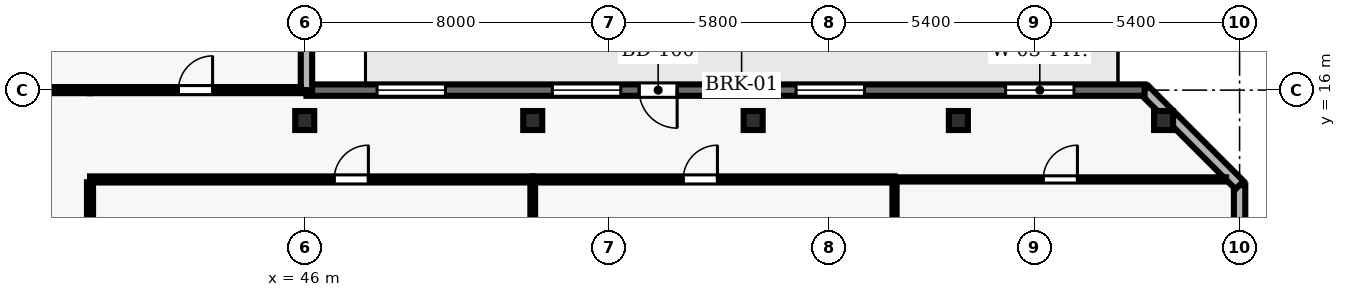
"""IFC4 building model, lengths in metres.
Left out: names, types, materials, properties, quantities, classifications, styles, units other than length and angle.
Written with IfcOpenShell. Run it as: python <this file> out.ifc"""

import sys

from ifc_helpers import new_model, si_unit, direction, frame, frame_2d, origin, origin_2d, place, context, subcontext, project, spatial, rectangle, hollow_rectangle, extrude, element, fill, save


model = new_model("IFC4")
c1 = context("Model", 3, precision=1e-05, world=origin(), true_north=direction((0.0, 1.0)))
c2 = subcontext(c1, "Body", "Model", "MODEL_VIEW")
j1 = project(units=[si_unit("LENGTHUNIT", "METRE"), si_unit("PLANEANGLEUNIT", "RADIAN")], contexts=[c1])
p1 = place(None, origin())
s1 = spatial("IfcSite", under=j1, at=p1, CompositionType="ELEMENT")
p2 = place(p1, origin())
s2 = spatial("IfcBuilding", under=s1, at=p2, CompositionType="ELEMENT")
p3 = place(p2, frame((0.0, 0.0, 142.4)))
s3 = spatial("IfcBuildingStorey", under=s2, at=p3, CompositionType="ELEMENT", Elevation=142.4)
for number, where, z_axis, x_axis in (
    (1, (46.0, 15.2, 0.0), (0.0, 0.0, 1.0), (1.0, 0.0, 0.0)),
    (2, (52.0, 15.2, 0.0), (0.0, 0.0, 1.0), (1.0, 0.0, 0.0)),
    (3, (57.8, 15.2, 0.0), (0.0, 0.0, 1.0), (1.0, 0.0, 0.0)),
    (4, (63.2, 15.2, 0.0), (0.0, 0.0, 1.0), (1.0, 0.0, 0.0)),
    (5, (68.6, 15.2, 0.0), (0.0, 0.0, 1.0), (1.0, 0.0, 0.0)),
):
    element("IfcColumn", number, at=place(p3, frame(where, z_axis=z_axis, x_axis=x_axis)), inside=s3, PredefinedType="COLUMN", context=c2, shape_type="SweptSolid", body=[
        extrude(hollow_rectangle(XDim=0.5, YDim=0.5, WallThickness=0.025, at=origin_2d()), origin(), (0.0, 0.0, 1.0), 3.9),
    ])
p4 = place(p3, frame((70.6, 2.5, 0.0), z_axis=(0.0, 0.0, 1.0), x_axis=(0.0, 1.0, 0.0)))
e6 = element("IfcWall", 6, at=p4, inside=s3, PredefinedType="SOLIDWALL", context=c2, shape_type="SweptSolid", body=[
    extrude(rectangle(XDim=11.0, YDim=0.3, at=frame_2d((5.5, 0.0))), origin(), (0.0, 0.0, 1.0), 3.69),
])
p5 = place(p4, frame((2.15, 0.0, 0.9)))
e7 = element("IfcOpeningElement", 7, at=p5, cuts=e6, PredefinedType="OPENING", context=c2, shape_type="SweptSolid", body=[
    extrude(rectangle(XDim=1.2, YDim=1.6, at=frame_2d((0.6, 0.8))), frame((0.0, 0.16, 0.0), z_axis=(0.0, -1.0, 0.0), x_axis=(1.0, 0.0, 0.0)), (0.0, 0.0, 1.0), 0.32),
])
p6 = place(p4, frame((7.65, 0.0, 0.9)))
e8 = element("IfcOpeningElement", 8, at=p6, cuts=e6, PredefinedType="OPENING", context=c2, shape_type="SweptSolid", body=[
    extrude(rectangle(XDim=1.2, YDim=1.6, at=frame_2d((0.6, 0.8))), frame((0.0, 0.16, 0.0), z_axis=(0.0, -1.0, 0.0), x_axis=(1.0, 0.0, 0.0)), (0.0, 0.0, 1.0), 0.32),
])
p7 = place(p3, frame((70.6, 13.5, 0.0), z_axis=(0.0, 0.0, 1.0), x_axis=(-0.707106781187, 0.707106781187, 0.0)))
e9 = element("IfcWall", 9, at=p7, inside=s3, PredefinedType="SOLIDWALL", context=c2, shape_type="SweptSolid", body=[
    extrude(rectangle(XDim=3.536, YDim=0.3, at=frame_2d((1.768, 0.0))), origin(), (0.0, 0.0, 1.0), 3.69),
])
p8 = place(p3, frame((68.1, 16.0, 0.0), z_axis=(0.0, 0.0, 1.0), x_axis=(-1.0, 0.0, 0.0)))
e10 = element("IfcWall", 10, at=p8, inside=s3, PredefinedType="SOLIDWALL", context=c2, shape_type="SweptSolid", body=[
    extrude(rectangle(XDim=22.054, YDim=0.3, at=frame_2d((11.027, 0.0))), origin(), (0.0, 0.0, 1.0), 3.69),
])
p9 = place(p8, frame((12.3, 0.0, 0.0)))
e11 = element("IfcOpeningElement", 11, at=p9, cuts=e10, PredefinedType="OPENING", context=c2, shape_type="SweptSolid", body=[
    extrude(rectangle(XDim=1.0, YDim=2.2, at=frame_2d((0.5, 1.1))), frame((0.0, 0.16, 0.0), z_axis=(0.0, -1.0, 0.0), x_axis=(1.0, 0.0, 0.0)), (0.0, 0.0, 1.0), 0.32),
])
p10 = place(p8, frame((1.857, 0.0, 0.9)))
e12 = element("IfcOpeningElement", 12, at=p10, cuts=e10, PredefinedType="OPENING", context=c2, shape_type="SweptSolid", body=[
    extrude(rectangle(XDim=1.8, YDim=1.6, at=frame_2d((0.9, 0.8))), frame((0.0, 0.16, 0.0), z_axis=(0.0, -1.0, 0.0), x_axis=(1.0, 0.0, 0.0)), (0.0, 0.0, 1.0), 0.32),
])
p11 = place(p8, frame((7.37, 0.0, 0.9)))
e13 = element("IfcOpeningElement", 13, at=p11, cuts=e10, PredefinedType="OPENING", context=c2, shape_type="SweptSolid", body=[
    extrude(rectangle(XDim=1.8, YDim=1.6, at=frame_2d((0.9, 0.8))), frame((0.0, 0.16, 0.0), z_axis=(0.0, -1.0, 0.0), x_axis=(1.0, 0.0, 0.0)), (0.0, 0.0, 1.0), 0.32),
])
p12 = place(p8, frame((13.784, 0.0, 0.9)))
e14 = element("IfcOpeningElement", 14, at=p12, cuts=e10, PredefinedType="OPENING", context=c2, shape_type="SweptSolid", body=[
    extrude(rectangle(XDim=1.8, YDim=1.6, at=frame_2d((0.9, 0.8))), frame((0.0, 0.16, 0.0), z_axis=(0.0, -1.0, 0.0), x_axis=(1.0, 0.0, 0.0)), (0.0, 0.0, 1.0), 0.32),
])
p13 = place(p8, frame((18.397, 0.0, 0.9)))
e15 = element("IfcOpeningElement", 15, at=p13, cuts=e10, PredefinedType="OPENING", context=c2, shape_type="SweptSolid", body=[
    extrude(rectangle(XDim=1.8, YDim=1.6, at=frame_2d((0.9, 0.8))), frame((0.0, 0.16, 0.0), z_axis=(0.0, -1.0, 0.0), x_axis=(1.0, 0.0, 0.0)), (0.0, 0.0, 1.0), 0.32),
])
p14 = place(p3, frame((46.046, 16.0, 0.0), z_axis=(0.0, 0.0, 1.0), x_axis=(0.0, 1.0, 0.0)))
e16 = element("IfcWall", 16, at=p14, inside=s3, PredefinedType="SOLIDWALL", context=c2, shape_type="SweptSolid", body=[
    extrude(rectangle(XDim=7.8, YDim=0.3, at=frame_2d((3.9, 0.0))), origin(), (0.0, 0.0, 1.0), 3.69),
])
p15 = place(p14, frame((2.85, 0.0, 0.9)))
e17 = element("IfcOpeningElement", 17, at=p15, cuts=e16, PredefinedType="OPENING", context=c2, shape_type="SweptSolid", body=[
    extrude(rectangle(XDim=2.1, YDim=1.6, at=frame_2d((1.05, 0.8))), frame((0.0, 0.16, 0.0), z_axis=(0.0, -1.0, 0.0), x_axis=(1.0, 0.0, 0.0)), (0.0, 0.0, 1.0), 0.32),
])
p16 = place(p3, frame((40.35, 13.65, 0.0), z_axis=(0.0, 0.0, 1.0), x_axis=(1.0, 0.0, 0.0)))
e18 = element("IfcWall", 18, at=p16, inside=s3, PredefinedType="PARTITIONING", context=c2, shape_type="SweptSolid", body=[
    extrude(rectangle(XDim=11.65, YDim=0.16, at=frame_2d((5.825, 0.0))), origin(), (0.0, 0.0, 1.0), 3.69),
])
p17 = place(p16, frame((6.425, 0.0, 0.0)))
e19 = element("IfcOpeningElement", 19, at=p17, cuts=e18, PredefinedType="OPENING", context=c2, shape_type="SweptSolid", body=[
    extrude(rectangle(XDim=0.9, YDim=2.1, at=frame_2d((0.45, 1.05))), frame((0.0, 0.09, 0.0), z_axis=(0.0, -1.0, 0.0), x_axis=(1.0, 0.0, 0.0)), (0.0, 0.0, 1.0), 0.18),
])
p18 = place(p3, frame((40.35, 16.0, 0.0), z_axis=(0.0, 0.0, 1.0), x_axis=(-1.0, 0.0, 0.0)))
e20 = element("IfcWall", 20, at=p18, inside=s3, PredefinedType="PARTITIONING", context=c2, shape_type="SweptSolid", body=[
    extrude(rectangle(XDim=2.3, YDim=0.16, at=frame_2d((1.15, 0.0))), origin(), (0.0, 0.0, 1.0), 3.69),
])
p19 = place(p3, frame((40.35, 16.0, 0.0), z_axis=(0.0, 0.0, 1.0), x_axis=(1.0, 0.0, 0.0)))
e21 = element("IfcWall", 21, at=p19, inside=s3, PredefinedType="PARTITIONING", context=c2, shape_type="SweptSolid", body=[
    extrude(rectangle(XDim=5.551, YDim=0.16, at=frame_2d((2.775, 0.0))), origin(), (0.0, 0.0, 1.0), 3.69),
])
p20 = place(p19, frame((2.326, 0.0, 0.0)))
e22 = element("IfcOpeningElement", 22, at=p20, cuts=e21, PredefinedType="OPENING", context=c2, shape_type="SweptSolid", body=[
    extrude(rectangle(XDim=0.9, YDim=2.1, at=frame_2d((0.45, 1.05))), frame((0.0, 0.09, 0.0), z_axis=(0.0, -1.0, 0.0), x_axis=(1.0, 0.0, 0.0)), (0.0, 0.0, 1.0), 0.18),
])
p21 = place(p3, frame((52.0, 13.65, 0.0), z_axis=(0.0, 0.0, 1.0), x_axis=(1.0, 0.0, 0.0)))
e23 = element("IfcWall", 23, at=p21, inside=s3, PredefinedType="PARTITIONING", context=c2, shape_type="SweptSolid", body=[
    extrude(rectangle(XDim=9.52, YDim=0.16, at=frame_2d((4.76, 0.0))), origin(), (0.0, 0.0, 1.0), 3.69),
])
p22 = place(p21, frame((3.96, 0.0, 0.0)))
e24 = element("IfcOpeningElement", 24, at=p22, cuts=e23, PredefinedType="OPENING", context=c2, shape_type="SweptSolid", body=[
    extrude(rectangle(XDim=0.9, YDim=2.1, at=frame_2d((0.45, 1.05))), frame((0.0, 0.09, 0.0), z_axis=(0.0, -1.0, 0.0), x_axis=(1.0, 0.0, 0.0)), (0.0, 0.0, 1.0), 0.18),
])
p23 = place(p3, frame((61.52, 13.65, 0.0), z_axis=(0.0, 0.0, 1.0), x_axis=(1.0, 0.0, 0.0)))
e25 = element("IfcWall", 25, at=p23, inside=s3, PredefinedType="MOVABLE", context=c2, shape_type="SweptSolid", body=[
    extrude(rectangle(XDim=8.725, YDim=0.11, at=frame_2d((4.363, 0.0))), origin(), (0.0, 0.0, 1.0), 3.69),
])
p24 = place(p23, frame((3.913, 0.0, 0.0)))
e26 = element("IfcOpeningElement", 26, at=p24, cuts=e25, PredefinedType="OPENING", context=c2, shape_type="SweptSolid", body=[
    extrude(rectangle(XDim=0.9, YDim=2.1, at=frame_2d((0.45, 1.05))), frame((0.0, 0.065, 0.0), z_axis=(0.0, -1.0, 0.0), x_axis=(1.0, 0.0, 0.0)), (0.0, 0.0, 1.0), 0.13),
])
p25 = place(p3, frame((40.35, 8.008, 0.0), z_axis=(0.0, 0.0, 1.0), x_axis=(0.0, 1.0, 0.0)))
e27 = element("IfcWall", 27, at=p25, inside=s3, PredefinedType="PARTITIONING", context=c2, shape_type="SweptSolid", body=[
    extrude(rectangle(XDim=5.567, YDim=0.16, at=frame_2d((2.783, 0.0))), origin(), (0.0, 0.0, 1.0), 3.69),
])
p26 = place(p3, frame((52.0, 8.008, 0.0), z_axis=(0.0, 0.0, 1.0), x_axis=(0.0, 1.0, 0.0)))
e28 = element("IfcWall", 28, at=p26, inside=s3, PredefinedType="PARTITIONING", context=c2, shape_type="SweptSolid", body=[
    extrude(rectangle(XDim=5.567, YDim=0.125, at=frame_2d((2.783, 0.0))), origin(), (0.0, 0.0, 1.0), 3.074),
])
p27 = place(p3, frame((61.52, 8.008, 0.0), z_axis=(0.0, 0.0, 1.0), x_axis=(0.0, 1.0, 0.0)))
e29 = element("IfcWall", 29, at=p27, inside=s3, PredefinedType="MOVABLE", context=c2, shape_type="SweptSolid", body=[
    extrude(rectangle(XDim=5.567, YDim=0.11, at=frame_2d((2.783, 0.0))), origin(), (0.0, 0.0, 1.0), 3.69),
])
p28 = place(p9, origin())
e30 = element("IfcDoor", 30, at=p28, inside=s3, OperationType="SINGLE_SWING_LEFT", PredefinedType="DOOR", context=c2, shape_type="SweptSolid", body=[
    extrude(rectangle(XDim=1.0, YDim=2.2, at=frame_2d((0.5, 1.1))), frame((0.0, 0.025, 0.0), z_axis=(0.0, -1.0, 0.0), x_axis=(1.0, 0.0, 0.0)), (0.0, 0.0, 1.0), 0.05),
])
fill(e11, e30)
p29 = place(p10, origin())
e31 = element("IfcWindow", 31, at=p29, inside=s3, PartitioningType="SINGLE_PANEL", PredefinedType="WINDOW", context=c2, shape_type="SweptSolid", body=[
    extrude(rectangle(XDim=1.8, YDim=1.6, at=frame_2d((0.9, 0.8))), frame((0.0, 0.03, 0.0), z_axis=(0.0, -1.0, 0.0), x_axis=(1.0, 0.0, 0.0)), (0.0, 0.0, 1.0), 0.06),
])
fill(e12, e31)
p30 = place(p11, origin())
e32 = element("IfcWindow", 32, at=p30, inside=s3, PartitioningType="SINGLE_PANEL", PredefinedType="WINDOW", context=c2, shape_type="SweptSolid", body=[
    extrude(rectangle(XDim=1.8, YDim=1.6, at=frame_2d((0.9, 0.8))), frame((0.0, 0.03, 0.0), z_axis=(0.0, -1.0, 0.0), x_axis=(1.0, 0.0, 0.0)), (0.0, 0.0, 1.0), 0.06),
])
fill(e13, e32)
p31 = place(p12, origin())
e33 = element("IfcWindow", 33, at=p31, inside=s3, PartitioningType="SINGLE_PANEL", PredefinedType="WINDOW", context=c2, shape_type="SweptSolid", body=[
    extrude(rectangle(XDim=1.8, YDim=1.6, at=frame_2d((0.9, 0.8))), frame((0.0, 0.03, 0.0), z_axis=(0.0, -1.0, 0.0), x_axis=(1.0, 0.0, 0.0)), (0.0, 0.0, 1.0), 0.06),
])
fill(e14, e33)
p32 = place(p13, origin())
e34 = element("IfcWindow", 34, at=p32, inside=s3, PartitioningType="SINGLE_PANEL", PredefinedType="WINDOW", context=c2, shape_type="SweptSolid", body=[
    extrude(rectangle(XDim=1.8, YDim=1.6, at=frame_2d((0.9, 0.8))), frame((0.0, 0.03, 0.0), z_axis=(0.0, -1.0, 0.0), x_axis=(1.0, 0.0, 0.0)), (0.0, 0.0, 1.0), 0.06),
])
fill(e15, e34)
p33 = place(p17, origin())
e35 = element("IfcDoor", 35, at=p33, inside=s3, OperationType="SINGLE_SWING_RIGHT", PredefinedType="DOOR", context=c2, shape_type="SweptSolid", body=[
    extrude(rectangle(XDim=0.9, YDim=2.1, at=frame_2d((0.45, 1.05))), frame((0.0, 0.025, 0.0), z_axis=(0.0, -1.0, 0.0), x_axis=(1.0, 0.0, 0.0)), (0.0, 0.0, 1.0), 0.05),
])
fill(e19, e35)
p34 = place(p22, origin())
e36 = element("IfcDoor", 36, at=p34, inside=s3, OperationType="SINGLE_SWING_RIGHT", PredefinedType="DOOR", context=c2, shape_type="SweptSolid", body=[
    extrude(rectangle(XDim=0.9, YDim=2.1, at=frame_2d((0.45, 1.05))), frame((0.0, 0.025, 0.0), z_axis=(0.0, -1.0, 0.0), x_axis=(1.0, 0.0, 0.0)), (0.0, 0.0, 1.0), 0.05),
])
fill(e24, e36)
p35 = place(p24, origin())
e37 = element("IfcDoor", 37, at=p35, inside=s3, OperationType="SINGLE_SWING_RIGHT", PredefinedType="DOOR", context=c2, shape_type="SweptSolid", body=[
    extrude(rectangle(XDim=0.9, YDim=2.1, at=frame_2d((0.45, 1.05))), frame((0.0, 0.025, 0.0), z_axis=(0.0, -1.0, 0.0), x_axis=(1.0, 0.0, 0.0)), (0.0, 0.0, 1.0), 0.05),
])
fill(e26, e37)
p36 = place(p20, origin())
e38 = element("IfcDoor", 38, at=p36, inside=s3, OperationType="SINGLE_SWING_RIGHT", PredefinedType="DOOR", context=c2, shape_type="SweptSolid", body=[
    extrude(rectangle(XDim=0.9, YDim=2.1, at=frame_2d((0.45, 1.05))), frame((0.0, 0.025, 0.0), z_axis=(0.0, -1.0, 0.0), x_axis=(1.0, 0.0, 0.0)), (0.0, 0.0, 1.0), 0.05),
])
fill(e22, e38)
save(model, sys.argv[1])
